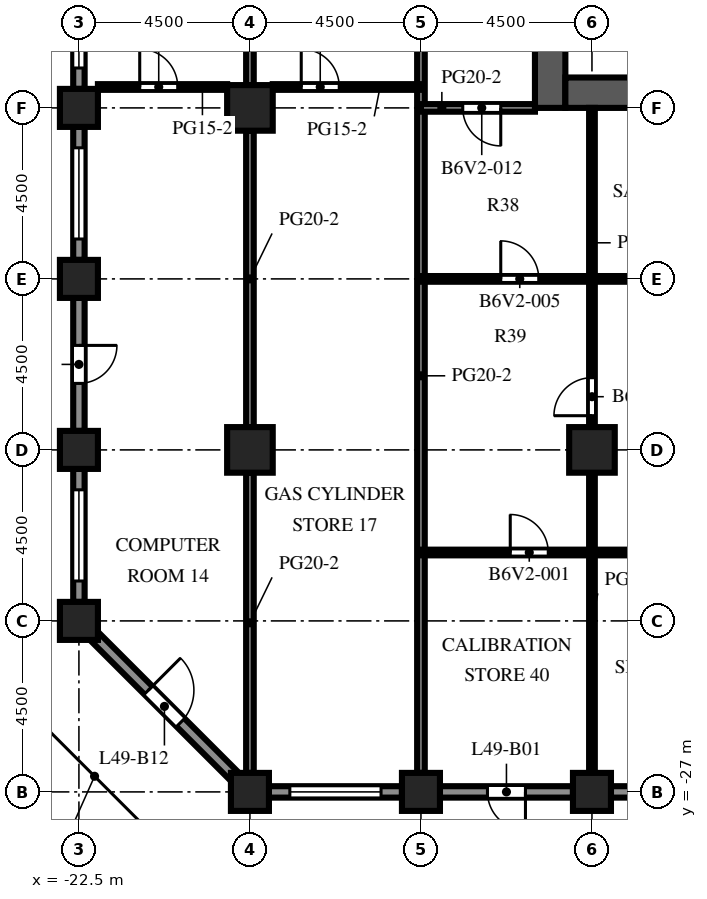
"""IFC4 building model, lengths in metres.
Left out: names, types, materials, properties, quantities, classifications, styles, units other than length and angle.
Written with IfcOpenShell. Run it as: python <this file> out.ifc"""

import sys

from ifc_helpers import new_model, si_unit, direction, frame, frame_2d, origin, origin_2d, place, context, subcontext, project, spatial, rectangle, extrude, element, fill, save


model = new_model("IFC4")
c1 = context("Model", 3, precision=1e-05, world=origin(), true_north=direction((0.0, 1.0)))
c2 = subcontext(c1, "Body", "Model", "MODEL_VIEW")
j1 = project(units=[si_unit("LENGTHUNIT", "METRE"), si_unit("PLANEANGLEUNIT", "RADIAN")], contexts=[c1])
p1 = place(None, origin())
s1 = spatial("IfcSite", under=j1, at=p1, CompositionType="ELEMENT")
p2 = place(p1, origin())
s2 = spatial("IfcBuilding", under=s1, at=p2, CompositionType="ELEMENT")
p3 = place(p2, frame((0.0, 0.0, 216.1)))
s3 = spatial("IfcBuildingStorey", under=s2, at=p3, CompositionType="ELEMENT", Elevation=216.1)
for number, where, z_axis, x_axis in (
    (1, (-22.5, -22.5, 0.0), (0.0, 0.0, 1.0), (1.0, 0.0, 0.0)),
    (2, (-22.5, -18.0, 0.0), (0.0, 0.0, 1.0), (1.0, 0.0, 0.0)),
    (3, (-22.5, -13.5, 0.0), (0.0, 0.0, 1.0), (1.0, 0.0, 0.0)),
    (4, (-22.5, -9.0, 0.0), (0.0, 0.0, 1.0), (1.0, 0.0, 0.0)),
    (5, (-18.0, -27.0, 0.0), (0.0, 0.0, 1.0), (1.0, 0.0, 0.0)),
    (6, (-13.5, -27.0, 0.0), (0.0, 0.0, 1.0), (1.0, 0.0, 0.0)),
    (7, (-9.0, -27.0, 0.0), (0.0, 0.0, 1.0), (1.0, 0.0, 0.0)),
):
    element("IfcColumn", number, at=place(p3, frame(where, z_axis=z_axis, x_axis=x_axis)), inside=s3, PredefinedType="COLUMN", context=c2, shape_type="SweptSolid", body=[
        extrude(rectangle(XDim=1.0, YDim=1.0, at=origin_2d()), origin(), (0.0, 0.0, 1.0), 4.1),
    ])
for number, where, z_axis, x_axis in (
    (8, (-18.0, -18.0, 0.0), (0.0, 0.0, 1.0), (1.0, 0.0, 0.0)),
    (9, (-18.0, -9.0, 0.0), (0.0, 0.0, 1.0), (1.0, 0.0, 0.0)),
    (10, (-9.0, -18.0, 0.0), (0.0, 0.0, 1.0), (1.0, 0.0, 0.0)),
):
    element("IfcColumn", number, at=place(p3, frame(where, z_axis=z_axis, x_axis=x_axis)), inside=s3, PredefinedType="COLUMN", context=c2, shape_type="SweptSolid", body=[
        extrude(rectangle(XDim=1.2, YDim=1.2, at=origin_2d()), origin(), (0.0, 0.0, 1.0), 4.1),
    ])
p4 = place(p3, frame((-10.1, -9.0, 0.0), z_axis=(0.0, 0.0, 1.0), x_axis=(0.0, 1.0, 0.0)))
e11 = element("IfcWall", 11, at=p4, inside=s3, PredefinedType="SHEAR", context=c2, shape_type="SweptSolid", body=[
    extrude(rectangle(XDim=27.5, YDim=0.8, at=frame_2d((13.75, 0.0))), origin(), (0.0, 0.0, 1.0), 4.1),
])
p5 = place(p4, frame((12.55, 0.0, 0.0)))
e12 = element("IfcOpeningElement", 12, at=p5, cuts=e11, PredefinedType="OPENING", context=c2, shape_type="SweptSolid", body=[
    extrude(rectangle(XDim=2.4, YDim=2.4, at=frame_2d((1.2, 1.2))), frame((0.0, 0.41, 0.0), z_axis=(0.0, -1.0, 0.0), x_axis=(1.0, 0.0, 0.0)), (0.0, 0.0, 1.0), 0.82),
])
p6 = place(p4, frame((6.825, 0.0, 0.0)))
e13 = element("IfcOpeningElement", 13, at=p6, cuts=e11, PredefinedType="OPENING", context=c2, shape_type="SweptSolid", body=[
    extrude(rectangle(XDim=1.2, YDim=2.1, at=frame_2d((0.6, 1.05))), frame((0.0, 0.41, 0.0), z_axis=(0.0, -1.0, 0.0), x_axis=(1.0, 0.0, 0.0)), (0.0, 0.0, 1.0), 0.82),
])
p7 = place(p4, frame((19.475, 0.0, 0.0)))
e14 = element("IfcOpeningElement", 14, at=p7, cuts=e11, PredefinedType="OPENING", context=c2, shape_type="SweptSolid", body=[
    extrude(rectangle(XDim=1.2, YDim=2.1, at=frame_2d((0.6, 1.05))), frame((0.0, 0.41, 0.0), z_axis=(0.0, -1.0, 0.0), x_axis=(1.0, 0.0, 0.0)), (0.0, 0.0, 1.0), 0.82),
])
p8 = place(p3, frame((-9.7, -8.6, 0.0), z_axis=(0.0, 0.0, 1.0), x_axis=(1.0, 0.0, 0.0)))
e15 = element("IfcWall", 15, at=p8, inside=s3, PredefinedType="SHEAR", context=c2, shape_type="SweptSolid", body=[
    extrude(rectangle(XDim=10.4, YDim=0.8, at=frame_2d((5.2, 0.0))), origin(), (0.0, 0.0, 1.0), 4.1),
])
p9 = place(p3, frame((-14.0, -27.0, 0.0), z_axis=(0.0, 0.0, 1.0), x_axis=(-1.0, 0.0, 0.0)))
e16 = element("IfcWall", 16, at=p9, inside=s3, PredefinedType="SOLIDWALL", context=c2, shape_type="SweptSolid", body=[
    extrude(rectangle(XDim=3.5, YDim=0.3, at=frame_2d((1.75, 0.0))), origin(), (0.0, 0.0, 1.0), 2.7),
])
p10 = place(p9, frame((0.55, 0.0, 0.8)))
e17 = element("IfcOpeningElement", 17, at=p10, cuts=e16, PredefinedType="OPENING", context=c2, shape_type="SweptSolid", body=[
    extrude(rectangle(XDim=2.4, YDim=1.7, at=frame_2d((1.2, 0.85))), frame((0.0, 0.16, 0.0), z_axis=(0.0, -1.0, 0.0), x_axis=(1.0, 0.0, 0.0)), (0.0, 0.0, 1.0), 0.32),
])
p11 = place(p3, frame((-9.5, -27.0, 0.0), z_axis=(0.0, 0.0, 1.0), x_axis=(-1.0, 0.0, 0.0)))
e18 = element("IfcWall", 18, at=p11, inside=s3, PredefinedType="SOLIDWALL", context=c2, shape_type="SweptSolid", body=[
    extrude(rectangle(XDim=3.5, YDim=0.3, at=frame_2d((1.75, 0.0))), origin(), (0.0, 0.0, 1.0), 2.7),
])
p12 = place(p11, frame((1.25, 0.0, 0.0)))
e19 = element("IfcOpeningElement", 19, at=p12, cuts=e18, PredefinedType="OPENING", context=c2, shape_type="SweptSolid", body=[
    extrude(rectangle(XDim=1.0, YDim=2.2, at=frame_2d((0.5, 1.1))), frame((0.0, 0.16, 0.0), z_axis=(0.0, -1.0, 0.0), x_axis=(1.0, 0.0, 0.0)), (0.0, 0.0, 1.0), 0.32),
])
p13 = place(p3, frame((-5.0, -27.0, 0.0), z_axis=(0.0, 0.0, 1.0), x_axis=(-1.0, 0.0, 0.0)))
e20 = element("IfcWall", 20, at=p13, inside=s3, PredefinedType="SOLIDWALL", context=c2, shape_type="SweptSolid", body=[
    extrude(rectangle(XDim=3.5, YDim=0.3, at=frame_2d((1.75, 0.0))), origin(), (0.0, 0.0, 1.0), 2.7),
])
p14 = place(p13, frame((0.55, 0.0, 0.8)))
e21 = element("IfcOpeningElement", 21, at=p14, cuts=e20, PredefinedType="OPENING", context=c2, shape_type="SweptSolid", body=[
    extrude(rectangle(XDim=2.4, YDim=1.7, at=frame_2d((1.2, 0.85))), frame((0.0, 0.16, 0.0), z_axis=(0.0, -1.0, 0.0), x_axis=(1.0, 0.0, 0.0)), (0.0, 0.0, 1.0), 0.32),
])
p15 = place(p3, frame((-22.5, -8.5, 0.0), z_axis=(0.0, 0.0, 1.0), x_axis=(0.0, 1.0, 0.0)))
e22 = element("IfcWall", 22, at=p15, inside=s3, PredefinedType="SOLIDWALL", context=c2, shape_type="SweptSolid", body=[
    extrude(rectangle(XDim=3.5, YDim=0.3, at=frame_2d((1.75, 0.0))), origin(), (0.0, 0.0, 1.0), 2.7),
])
p16 = place(p15, frame((0.55, 0.0, 0.8)))
e23 = element("IfcOpeningElement", 23, at=p16, cuts=e22, PredefinedType="OPENING", context=c2, shape_type="SweptSolid", body=[
    extrude(rectangle(XDim=2.4, YDim=1.7, at=frame_2d((1.2, 0.85))), frame((0.0, 0.16, 0.0), z_axis=(0.0, -1.0, 0.0), x_axis=(1.0, 0.0, 0.0)), (0.0, 0.0, 1.0), 0.32),
])
p17 = place(p3, frame((-22.5, -13.0, 0.0), z_axis=(0.0, 0.0, 1.0), x_axis=(0.0, 1.0, 0.0)))
e24 = element("IfcWall", 24, at=p17, inside=s3, PredefinedType="SOLIDWALL", context=c2, shape_type="SweptSolid", body=[
    extrude(rectangle(XDim=3.5, YDim=0.3, at=frame_2d((1.75, 0.0))), origin(), (0.0, 0.0, 1.0), 2.7),
])
p18 = place(p17, frame((0.55, 0.0, 0.8)))
e25 = element("IfcOpeningElement", 25, at=p18, cuts=e24, PredefinedType="OPENING", context=c2, shape_type="SweptSolid", body=[
    extrude(rectangle(XDim=2.4, YDim=1.7, at=frame_2d((1.2, 0.85))), frame((0.0, 0.16, 0.0), z_axis=(0.0, -1.0, 0.0), x_axis=(1.0, 0.0, 0.0)), (0.0, 0.0, 1.0), 0.32),
])
p19 = place(p3, frame((-22.5, -17.5, 0.0), z_axis=(0.0, 0.0, 1.0), x_axis=(0.0, 1.0, 0.0)))
e26 = element("IfcWall", 26, at=p19, inside=s3, PredefinedType="SOLIDWALL", context=c2, shape_type="SweptSolid", body=[
    extrude(rectangle(XDim=3.5, YDim=0.3, at=frame_2d((1.75, 0.0))), origin(), (0.0, 0.0, 1.0), 2.7),
])
p20 = place(p19, frame((1.25, 0.0, 0.0)))
e27 = element("IfcOpeningElement", 27, at=p20, cuts=e26, PredefinedType="OPENING", context=c2, shape_type="SweptSolid", body=[
    extrude(rectangle(XDim=1.0, YDim=2.2, at=frame_2d((0.5, 1.1))), frame((0.0, 0.16, 0.0), z_axis=(0.0, -1.0, 0.0), x_axis=(1.0, 0.0, 0.0)), (0.0, 0.0, 1.0), 0.32),
])
p21 = place(p3, frame((-22.5, -22.0, 0.0), z_axis=(0.0, 0.0, 1.0), x_axis=(0.0, 1.0, 0.0)))
e28 = element("IfcWall", 28, at=p21, inside=s3, PredefinedType="SOLIDWALL", context=c2, shape_type="SweptSolid", body=[
    extrude(rectangle(XDim=3.5, YDim=0.3, at=frame_2d((1.75, 0.0))), origin(), (0.0, 0.0, 1.0), 2.7),
])
p22 = place(p21, frame((0.55, 0.0, 0.8)))
e29 = element("IfcOpeningElement", 29, at=p22, cuts=e28, PredefinedType="OPENING", context=c2, shape_type="SweptSolid", body=[
    extrude(rectangle(XDim=2.4, YDim=1.7, at=frame_2d((1.2, 0.85))), frame((0.0, 0.16, 0.0), z_axis=(0.0, -1.0, 0.0), x_axis=(1.0, 0.0, 0.0)), (0.0, 0.0, 1.0), 0.32),
])
p23 = place(p3, frame((-18.394, -26.606, 0.0), z_axis=(0.0, 0.0, 1.0), x_axis=(-0.707106781187, 0.707106781187, 0.0)))
e30 = element("IfcWall", 30, at=p23, inside=s3, PredefinedType="SOLIDWALL", context=c2, shape_type="SweptSolid", body=[
    extrude(rectangle(XDim=5.25, YDim=0.3, at=frame_2d((2.625, 0.0))), origin(), (0.0, 0.0, 1.0), 2.7),
])
p24 = place(p23, frame((2.025, 0.0, 0.0)))
e31 = element("IfcOpeningElement", 31, at=p24, cuts=e30, PredefinedType="OPENING", context=c2, shape_type="SweptSolid", body=[
    extrude(rectangle(XDim=1.2, YDim=2.2, at=frame_2d((0.6, 1.1))), frame((0.0, 0.16, 0.0), z_axis=(0.0, -1.0, 0.0), x_axis=(1.0, 0.0, 0.0)), (0.0, 0.0, 1.0), 0.32),
])
p25 = place(p3, frame((-18.0, -26.5, 0.0), z_axis=(0.0, 0.0, 1.0), x_axis=(0.0, 1.0, 0.0)))
e32 = element("IfcWall", 32, at=p25, inside=s3, PredefinedType="PARTITIONING", context=c2, shape_type="SweptSolid", body=[
    extrude(rectangle(XDim=7.9, YDim=0.2, at=frame_2d((3.95, 0.0))), origin(), (0.0, 0.0, 1.0), 3.5),
])
for number, where, z_axis, x_axis in (
    (33, (-18.0, -17.4, 0.0), (0.0, 0.0, 1.0), (0.0, 1.0, 0.0)),
    (34, (-18.0, -8.4, 0.0), (0.0, 0.0, 1.0), (0.0, 1.0, 0.0)),
):
    element("IfcWall", number, at=place(p3, frame(where, z_axis=z_axis, x_axis=x_axis)), inside=s3, PredefinedType="PARTITIONING", context=c2, shape_type="SweptSolid", body=[
        extrude(rectangle(XDim=7.8, YDim=0.2, at=frame_2d((3.9, 0.0))), origin(), (0.0, 0.0, 1.0), 3.5),
    ])
p26 = place(p3, frame((-13.5, -26.5, 0.0), z_axis=(0.0, 0.0, 1.0), x_axis=(0.0, 1.0, 0.0)))
e35 = element("IfcWall", 35, at=p26, inside=s3, PredefinedType="PARTITIONING", context=c2, shape_type="SweptSolid", body=[
    extrude(rectangle(XDim=29.75, YDim=0.2, at=frame_2d((14.875, 0.0))), origin(), (0.0, 0.0, 1.0), 3.5),
])
p27 = place(p26, frame((20.9, 0.0, 0.0)))
e36 = element("IfcOpeningElement", 36, at=p27, cuts=e35, PredefinedType="OPENING", context=c2, shape_type="SweptSolid", body=[
    extrude(rectangle(XDim=1.0, YDim=2.1, at=frame_2d((0.5, 1.05))), frame((0.0, 0.11, 0.0), z_axis=(0.0, -1.0, 0.0), x_axis=(1.0, 0.0, 0.0)), (0.0, 0.0, 1.0), 0.22),
])
p28 = place(p3, frame((-9.0, -26.5, 0.0), z_axis=(0.0, 0.0, 1.0), x_axis=(0.0, 1.0, 0.0)))
e37 = element("IfcWall", 37, at=p28, inside=s3, PredefinedType="PARTITIONING", context=c2, shape_type="SweptSolid", body=[
    extrude(rectangle(XDim=7.9, YDim=0.15, at=frame_2d((3.95, 0.0))), origin(), (0.0, 0.0, 1.0), 3.5),
])
p29 = place(p3, frame((-9.0, -9.0, 0.0), z_axis=(0.0, 0.0, 1.0), x_axis=(0.0, -1.0, 0.0)))
e38 = element("IfcWall", 38, at=p29, inside=s3, PredefinedType="PARTITIONING", context=c2, shape_type="SweptSolid", body=[
    extrude(rectangle(XDim=8.4, YDim=0.15, at=frame_2d((4.2, 0.0))), origin(), (0.0, 0.0, 1.0), 3.5),
])
p30 = place(p29, frame((7.1, 0.0, 0.0)))
e39 = element("IfcOpeningElement", 39, at=p30, cuts=e38, PredefinedType="OPENING", context=c2, shape_type="SweptSolid", body=[
    extrude(rectangle(XDim=1.0, YDim=2.1, at=frame_2d((0.5, 1.05))), frame((0.0, 0.085, 0.0), z_axis=(0.0, -1.0, 0.0), x_axis=(1.0, 0.0, 0.0)), (0.0, 0.0, 1.0), 0.17),
])
p31 = place(p3, frame((21.0, -20.7, 0.0), z_axis=(0.0, 0.0, 1.0), x_axis=(-1.0, 0.0, 0.0)))
e40 = element("IfcWall", 40, at=p31, inside=s3, PredefinedType="PARTITIONING", context=c2, shape_type="SweptSolid", body=[
    extrude(rectangle(XDim=34.5, YDim=0.15, at=frame_2d((17.25, 0.0))), origin(), (0.0, 0.0, 1.0), 3.5),
])
p32 = place(p31, frame((31.15, 0.0, 0.0)))
e41 = element("IfcOpeningElement", 41, at=p32, cuts=e40, PredefinedType="OPENING", context=c2, shape_type="SweptSolid", body=[
    extrude(rectangle(XDim=1.0, YDim=2.1, at=frame_2d((0.5, 1.05))), frame((0.0, 0.085, 0.0), z_axis=(0.0, -1.0, 0.0), x_axis=(1.0, 0.0, 0.0)), (0.0, 0.0, 1.0), 0.17),
])
p33 = place(p31, frame((25.65, 0.0, 0.0)))
e42 = element("IfcOpeningElement", 42, at=p33, cuts=e40, PredefinedType="OPENING", context=c2, shape_type="SweptSolid", body=[
    extrude(rectangle(XDim=1.0, YDim=2.1, at=frame_2d((0.5, 1.05))), frame((0.0, 0.085, 0.0), z_axis=(0.0, -1.0, 0.0), x_axis=(1.0, 0.0, 0.0)), (0.0, 0.0, 1.0), 0.17),
])
p34 = place(p31, frame((18.65, 0.0, 0.0)))
e43 = element("IfcOpeningElement", 43, at=p34, cuts=e40, PredefinedType="OPENING", context=c2, shape_type="SweptSolid", body=[
    extrude(rectangle(XDim=1.0, YDim=2.1, at=frame_2d((0.5, 1.05))), frame((0.0, 0.085, 0.0), z_axis=(0.0, -1.0, 0.0), x_axis=(1.0, 0.0, 0.0)), (0.0, 0.0, 1.0), 0.17),
])
p35 = place(p31, frame((7.65, 0.0, 0.0)))
e44 = element("IfcOpeningElement", 44, at=p35, cuts=e40, PredefinedType="OPENING", context=c2, shape_type="SweptSolid", body=[
    extrude(rectangle(XDim=1.0, YDim=2.1, at=frame_2d((0.5, 1.05))), frame((0.0, 0.085, 0.0), z_axis=(0.0, -1.0, 0.0), x_axis=(1.0, 0.0, 0.0)), (0.0, 0.0, 1.0), 0.17),
])
p36 = place(p3, frame((21.0, -13.5, 0.0), z_axis=(0.0, 0.0, 1.0), x_axis=(-1.0, 0.0, 0.0)))
e45 = element("IfcWall", 45, at=p36, inside=s3, PredefinedType="PARTITIONING", context=c2, shape_type="SweptSolid", body=[
    extrude(rectangle(XDim=34.5, YDim=0.15, at=frame_2d((17.25, 0.0))), origin(), (0.0, 0.0, 1.0), 3.5),
])
p37 = place(p36, frame((31.4, 0.0, 0.0)))
e46 = element("IfcOpeningElement", 46, at=p37, cuts=e45, PredefinedType="OPENING", context=c2, shape_type="SweptSolid", body=[
    extrude(rectangle(XDim=1.0, YDim=2.1, at=frame_2d((0.5, 1.05))), frame((0.0, 0.085, 0.0), z_axis=(0.0, -1.0, 0.0), x_axis=(1.0, 0.0, 0.0)), (0.0, 0.0, 1.0), 0.17),
])
p38 = place(p36, frame((24.15, 0.0, 0.0)))
e47 = element("IfcOpeningElement", 47, at=p38, cuts=e45, PredefinedType="OPENING", context=c2, shape_type="SweptSolid", body=[
    extrude(rectangle(XDim=1.0, YDim=2.1, at=frame_2d((0.5, 1.05))), frame((0.0, 0.085, 0.0), z_axis=(0.0, -1.0, 0.0), x_axis=(1.0, 0.0, 0.0)), (0.0, 0.0, 1.0), 0.17),
])
p39 = place(p36, frame((17.65, 0.0, 0.0)))
e48 = element("IfcOpeningElement", 48, at=p39, cuts=e45, PredefinedType="OPENING", context=c2, shape_type="SweptSolid", body=[
    extrude(rectangle(XDim=1.0, YDim=2.1, at=frame_2d((0.5, 1.05))), frame((0.0, 0.085, 0.0), z_axis=(0.0, -1.0, 0.0), x_axis=(1.0, 0.0, 0.0)), (0.0, 0.0, 1.0), 0.17),
])
p40 = place(p36, frame((7.65, 0.0, 0.0)))
e49 = element("IfcOpeningElement", 49, at=p40, cuts=e45, PredefinedType="OPENING", context=c2, shape_type="SweptSolid", body=[
    extrude(rectangle(XDim=1.0, YDim=2.1, at=frame_2d((0.5, 1.05))), frame((0.0, 0.085, 0.0), z_axis=(0.0, -1.0, 0.0), x_axis=(1.0, 0.0, 0.0)), (0.0, 0.0, 1.0), 0.17),
])
p41 = place(p3, frame((-10.5, -9.0, 0.0), z_axis=(0.0, 0.0, 1.0), x_axis=(-1.0, 0.0, 0.0)))
e50 = element("IfcWall", 50, at=p41, inside=s3, PredefinedType="PARTITIONING", context=c2, shape_type="SweptSolid", body=[
    extrude(rectangle(XDim=3.0, YDim=0.2, at=frame_2d((1.5, 0.0))), origin(), (0.0, 0.0, 1.0), 3.5),
])
p42 = place(p41, frame((0.9, 0.0, 0.0)))
e51 = element("IfcOpeningElement", 51, at=p42, cuts=e50, PredefinedType="OPENING", context=c2, shape_type="SweptSolid", body=[
    extrude(rectangle(XDim=1.0, YDim=2.1, at=frame_2d((0.5, 1.05))), frame((0.0, 0.11, 0.0), z_axis=(0.0, -1.0, 0.0), x_axis=(1.0, 0.0, 0.0)), (0.0, 0.0, 1.0), 0.22),
])
p43 = place(p3, frame((-18.6, -8.45, 0.0), z_axis=(0.0, 0.0, 1.0), x_axis=(-1.0, 0.0, 0.0)))
e52 = element("IfcWall", 52, at=p43, inside=s3, PredefinedType="PARTITIONING", context=c2, shape_type="SweptSolid", body=[
    extrude(rectangle(XDim=3.4, YDim=0.15, at=frame_2d((1.7, 0.0))), origin(), (0.0, 0.0, 1.0), 3.5),
])
p44 = place(p43, frame((1.3, 0.0, 0.0)))
e53 = element("IfcOpeningElement", 53, at=p44, cuts=e52, PredefinedType="OPENING", context=c2, shape_type="SweptSolid", body=[
    extrude(rectangle(XDim=1.0, YDim=2.1, at=frame_2d((0.5, 1.05))), frame((0.0, 0.085, 0.0), z_axis=(0.0, -1.0, 0.0), x_axis=(1.0, 0.0, 0.0)), (0.0, 0.0, 1.0), 0.17),
])
p45 = place(p3, frame((-13.5, -8.45, 0.0), z_axis=(0.0, 0.0, 1.0), x_axis=(-1.0, 0.0, 0.0)))
e54 = element("IfcWall", 54, at=p45, inside=s3, PredefinedType="PARTITIONING", context=c2, shape_type="SweptSolid", body=[
    extrude(rectangle(XDim=3.9, YDim=0.15, at=frame_2d((1.95, 0.0))), origin(), (0.0, 0.0, 1.0), 3.5),
])
p46 = place(p45, frame((2.15, 0.0, 0.0)))
e55 = element("IfcOpeningElement", 55, at=p46, cuts=e54, PredefinedType="OPENING", context=c2, shape_type="SweptSolid", body=[
    extrude(rectangle(XDim=1.0, YDim=2.1, at=frame_2d((0.5, 1.05))), frame((0.0, 0.085, 0.0), z_axis=(0.0, -1.0, 0.0), x_axis=(1.0, 0.0, 0.0)), (0.0, 0.0, 1.0), 0.17),
])
p47 = place(p10, origin())
e56 = element("IfcWindow", 56, at=p47, inside=s3, PartitioningType="SINGLE_PANEL", PredefinedType="WINDOW", context=c2, shape_type="SweptSolid", body=[
    extrude(rectangle(XDim=2.4, YDim=1.7, at=frame_2d((1.2, 0.85))), frame((0.0, 0.03, 0.0), z_axis=(0.0, -1.0, 0.0), x_axis=(1.0, 0.0, 0.0)), (0.0, 0.0, 1.0), 0.06),
])
fill(e17, e56)
p48 = place(p12, origin())
e57 = element("IfcDoor", 57, at=p48, inside=s3, OperationType="SINGLE_SWING_LEFT", PredefinedType="DOOR", context=c2, shape_type="SweptSolid", body=[
    extrude(rectangle(XDim=1.0, YDim=2.2, at=frame_2d((0.5, 1.1))), frame((0.0, 0.025, 0.0), z_axis=(0.0, -1.0, 0.0), x_axis=(1.0, 0.0, 0.0)), (0.0, 0.0, 1.0), 0.05),
])
fill(e19, e57)
p49 = place(p16, origin())
e58 = element("IfcWindow", 58, at=p49, inside=s3, PartitioningType="SINGLE_PANEL", PredefinedType="WINDOW", context=c2, shape_type="SweptSolid", body=[
    extrude(rectangle(XDim=2.4, YDim=1.7, at=frame_2d((1.2, 0.85))), frame((0.0, 0.03, 0.0), z_axis=(0.0, -1.0, 0.0), x_axis=(1.0, 0.0, 0.0)), (0.0, 0.0, 1.0), 0.06),
])
fill(e23, e58)
p50 = place(p18, origin())
e59 = element("IfcWindow", 59, at=p50, inside=s3, PartitioningType="SINGLE_PANEL", PredefinedType="WINDOW", context=c2, shape_type="SweptSolid", body=[
    extrude(rectangle(XDim=2.4, YDim=1.7, at=frame_2d((1.2, 0.85))), frame((0.0, 0.03, 0.0), z_axis=(0.0, -1.0, 0.0), x_axis=(1.0, 0.0, 0.0)), (0.0, 0.0, 1.0), 0.06),
])
fill(e25, e59)
p51 = place(p20, origin())
e60 = element("IfcDoor", 60, at=p51, inside=s3, OperationType="SINGLE_SWING_RIGHT", PredefinedType="DOOR", context=c2, shape_type="SweptSolid", body=[
    extrude(rectangle(XDim=1.0, YDim=2.2, at=frame_2d((0.5, 1.1))), frame((0.0, 0.025, 0.0), z_axis=(0.0, -1.0, 0.0), x_axis=(1.0, 0.0, 0.0)), (0.0, 0.0, 1.0), 0.05),
])
fill(e27, e60)
p52 = place(p22, origin())
e61 = element("IfcWindow", 61, at=p52, inside=s3, PartitioningType="SINGLE_PANEL", PredefinedType="WINDOW", context=c2, shape_type="SweptSolid", body=[
    extrude(rectangle(XDim=2.4, YDim=1.7, at=frame_2d((1.2, 0.85))), frame((0.0, 0.03, 0.0), z_axis=(0.0, -1.0, 0.0), x_axis=(1.0, 0.0, 0.0)), (0.0, 0.0, 1.0), 0.06),
])
fill(e29, e61)
p53 = place(p24, origin())
e62 = element("IfcDoor", 62, at=p53, inside=s3, OperationType="SINGLE_SWING_RIGHT", PredefinedType="DOOR", context=c2, shape_type="SweptSolid", body=[
    extrude(rectangle(XDim=1.2, YDim=2.2, at=frame_2d((0.6, 1.1))), frame((0.0, 0.025, 0.0), z_axis=(0.0, -1.0, 0.0), x_axis=(1.0, 0.0, 0.0)), (0.0, 0.0, 1.0), 0.05),
])
fill(e31, e62)
p54 = place(p32, origin())
e63 = element("IfcDoor", 63, at=p54, inside=s3, OperationType="SINGLE_SWING_RIGHT", PredefinedType="DOOR", context=c2, shape_type="SweptSolid", body=[
    extrude(rectangle(XDim=1.0, YDim=2.1, at=frame_2d((0.5, 1.05))), frame((0.0, 0.025, 0.0), z_axis=(0.0, -1.0, 0.0), x_axis=(1.0, 0.0, 0.0)), (0.0, 0.0, 1.0), 0.05),
])
fill(e41, e63)
p55 = place(p37, origin())
e64 = element("IfcDoor", 64, at=p55, inside=s3, OperationType="SINGLE_SWING_RIGHT", PredefinedType="DOOR", context=c2, shape_type="SweptSolid", body=[
    extrude(rectangle(XDim=1.0, YDim=2.1, at=frame_2d((0.5, 1.05))), frame((0.0, 0.025, 0.0), z_axis=(0.0, -1.0, 0.0), x_axis=(1.0, 0.0, 0.0)), (0.0, 0.0, 1.0), 0.05),
])
fill(e46, e64)
p56 = place(p30, origin())
e65 = element("IfcDoor", 65, at=p56, inside=s3, OperationType="SINGLE_SWING_RIGHT", PredefinedType="DOOR", context=c2, shape_type="SweptSolid", body=[
    extrude(rectangle(XDim=1.0, YDim=2.1, at=frame_2d((0.5, 1.05))), frame((0.0, 0.025, 0.0), z_axis=(0.0, -1.0, 0.0), x_axis=(1.0, 0.0, 0.0)), (0.0, 0.0, 1.0), 0.05),
])
fill(e39, e65)
p57 = place(p42, origin())
e66 = element("IfcDoor", 66, at=p57, inside=s3, OperationType="SINGLE_SWING_LEFT", PredefinedType="DOOR", context=c2, shape_type="SweptSolid", body=[
    extrude(rectangle(XDim=1.0, YDim=2.1, at=frame_2d((0.5, 1.05))), frame((0.0, 0.025, 0.0), z_axis=(0.0, -1.0, 0.0), x_axis=(1.0, 0.0, 0.0)), (0.0, 0.0, 1.0), 0.05),
])
fill(e51, e66)
p58 = place(p44, origin())
e67 = element("IfcDoor", 67, at=p58, inside=s3, OperationType="SINGLE_SWING_RIGHT", PredefinedType="DOOR", context=c2, shape_type="SweptSolid", body=[
    extrude(rectangle(XDim=1.0, YDim=2.1, at=frame_2d((0.5, 1.05))), frame((0.0, 0.025, 0.0), z_axis=(0.0, -1.0, 0.0), x_axis=(1.0, 0.0, 0.0)), (0.0, 0.0, 1.0), 0.05),
])
fill(e53, e67)
p59 = place(p46, origin())
e68 = element("IfcDoor", 68, at=p59, inside=s3, OperationType="SINGLE_SWING_RIGHT", PredefinedType="DOOR", context=c2, shape_type="SweptSolid", body=[
    extrude(rectangle(XDim=1.0, YDim=2.1, at=frame_2d((0.5, 1.05))), frame((0.0, 0.025, 0.0), z_axis=(0.0, -1.0, 0.0), x_axis=(1.0, 0.0, 0.0)), (0.0, 0.0, 1.0), 0.05),
])
fill(e55, e68)
save(model, sys.argv[1])
